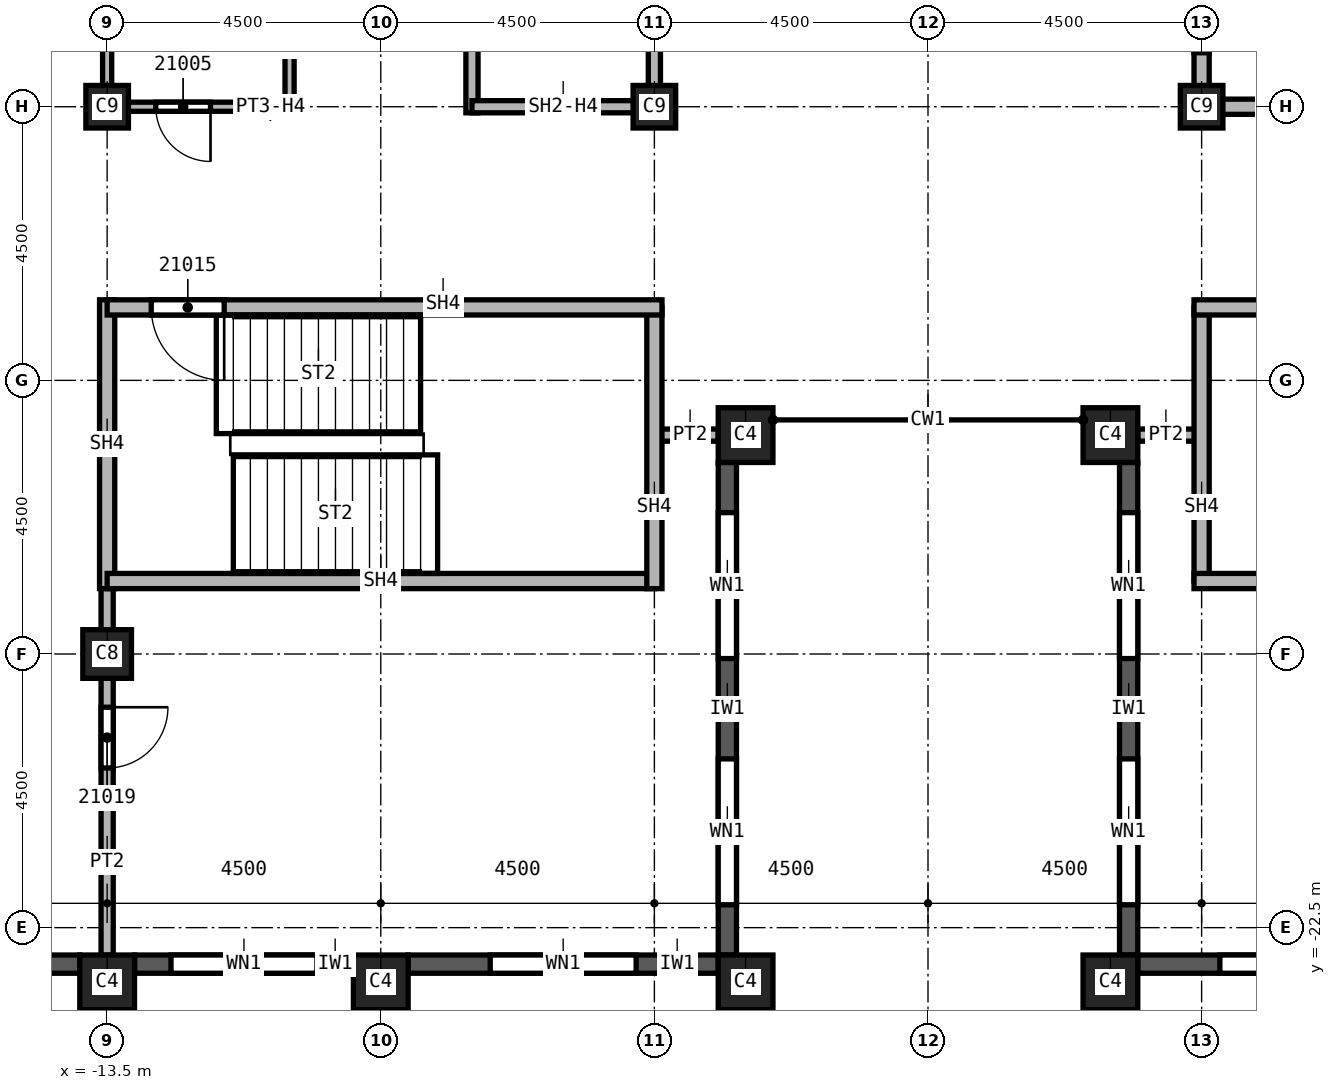
"""IFC4 building model, lengths in metres.
Left out: names, types, materials, properties, quantities, classifications, styles, units other than length and angle.
Written with IfcOpenShell. Run it as: python <this file> out.ifc"""

import sys

from ifc_helpers import new_model, si_unit, direction, frame, frame_2d, origin, origin_2d, place, context, subcontext, project, spatial, rectangle, extrude, element, fill, save


model = new_model("IFC4")
c1 = context("Model", 3, precision=1e-05, world=origin(), true_north=direction((0.0, 1.0)))
c2 = subcontext(c1, "Body", "Model", "MODEL_VIEW")
j1 = project(units=[si_unit("LENGTHUNIT", "METRE"), si_unit("PLANEANGLEUNIT", "RADIAN")], contexts=[c1])
p1 = place(None, origin())
s1 = spatial("IfcSite", under=j1, at=p1, CompositionType="ELEMENT")
p2 = place(p1, origin())
s2 = spatial("IfcBuilding", under=s1, at=p2, CompositionType="ELEMENT")
p3 = place(p2, frame((0.0, 0.0, 308.0)))
s3 = spatial("IfcBuildingStorey", under=s2, at=p3, CompositionType="ELEMENT", Elevation=308.0)
p4 = place(p3, frame((-13.5, -18.0, 0.0), z_axis=(0.0, 0.0, 1.0), x_axis=(1.0, 0.0, 0.0)))
e1 = element("IfcColumn", 1, at=p4, inside=s3, PredefinedType="COLUMN", context=c2, shape_type="SweptSolid", body=[
    extrude(rectangle(XDim=0.8, YDim=0.8, at=origin_2d()), origin(), (0.0, 0.0, 1.0), 3.74),
])
for number, where, z_axis, x_axis in (
    (2, (4.5, -9.0, 0.0), (0.0, 0.0, 1.0), (1.0, 0.0, 0.0)),
    (3, (-4.5, -9.0, 0.0), (0.0, 0.0, 1.0), (1.0, 0.0, 0.0)),
    (4, (-13.5, -9.0, 0.0), (0.0, 0.0, 1.0), (1.0, 0.0, 0.0)),
):
    element("IfcColumn", number, at=place(p3, frame(where, z_axis=z_axis, x_axis=x_axis)), inside=s3, PredefinedType="COLUMN", context=c2, shape_type="SweptSolid", body=[
        extrude(rectangle(XDim=0.7, YDim=0.7, at=origin_2d()), origin(), (0.0, 0.0, 1.0), 3.74),
    ])
for number, where, z_axis, x_axis in (
    (5, (3.0, -23.4, 0.0), (0.0, 0.0, 1.0), (1.0, 0.0, 0.0)),
    (6, (-3.0, -23.4, 0.0), (0.0, 0.0, 1.0), (1.0, 0.0, 0.0)),
    (7, (-9.0, -23.4, 0.0), (0.0, 0.0, 1.0), (1.0, 0.0, 0.0)),
    (8, (-13.5, -23.4, 0.0), (0.0, 0.0, 1.0), (1.0, 0.0, 0.0)),
    (9, (3.0, -14.4, 0.0), (0.0, 0.0, 1.0), (1.0, 0.0, 0.0)),
    (10, (-3.0, -14.4, 0.0), (0.0, 0.0, 1.0), (1.0, 0.0, 0.0)),
):
    element("IfcColumn", number, at=place(p3, frame(where, z_axis=z_axis, x_axis=x_axis)), inside=s3, PredefinedType="COLUMN", context=c2, shape_type="SweptSolid", body=[
        extrude(rectangle(XDim=0.9, YDim=0.9, at=origin_2d()), origin(), (0.0, 0.0, 1.0), 3.74),
    ])
p5 = place(p3, frame((-17.55, -23.1, 0.0), z_axis=(0.0, 0.0, 1.0), x_axis=(1.0, 0.0, 0.0)))
e11 = element("IfcWall", 11, at=p5, inside=s3, PredefinedType="SOLIDWALL", context=c2, shape_type="SweptSolid", body=[
    extrude(rectangle(XDim=3.6, YDim=0.3, at=frame_2d((1.8, 0.0))), origin(), (0.0, 0.0, 1.0), 3.14),
])
p6 = place(p5, frame((0.775, 0.0, 0.8)))
e12 = element("IfcOpeningElement", 12, at=p6, cuts=e11, PredefinedType="OPENING", context=c2, shape_type="SweptSolid", body=[
    extrude(rectangle(XDim=1.0, YDim=1.95, at=frame_2d((0.5, 0.975))), frame((0.0, 0.15, 0.0), z_axis=(0.0, -1.0, 0.0), x_axis=(1.0, 0.0, 0.0)), (0.0, 0.0, 1.0), 0.3),
])
p7 = place(p5, frame((2.375, 0.0, 0.8)))
e13 = element("IfcOpeningElement", 13, at=p7, cuts=e11, PredefinedType="OPENING", context=c2, shape_type="SweptSolid", body=[
    extrude(rectangle(XDim=0.6, YDim=1.95, at=frame_2d((0.3, 0.975))), frame((0.0, 0.15, 0.0), z_axis=(0.0, -1.0, 0.0), x_axis=(1.0, 0.0, 0.0)), (0.0, 0.0, 1.0), 0.3),
])
p8 = place(p3, frame((-13.05, -23.1, 0.0), z_axis=(0.0, 0.0, 1.0), x_axis=(1.0, 0.0, 0.0)))
e14 = element("IfcWall", 14, at=p8, inside=s3, PredefinedType="SOLIDWALL", context=c2, shape_type="SweptSolid", body=[
    extrude(rectangle(XDim=3.6, YDim=0.3, at=frame_2d((1.8, 0.0))), origin(), (0.0, 0.0, 1.0), 3.14),
])
p9 = place(p8, frame((0.6, 0.0, 0.8)))
e15 = element("IfcOpeningElement", 15, at=p9, cuts=e14, PredefinedType="OPENING", context=c2, shape_type="SweptSolid", body=[
    extrude(rectangle(XDim=2.4, YDim=1.95, at=frame_2d((1.2, 0.975))), frame((0.0, 0.15, 0.0), z_axis=(0.0, -1.0, 0.0), x_axis=(1.0, 0.0, 0.0)), (0.0, 0.0, 1.0), 0.3),
])
p10 = place(p3, frame((-8.55, -23.1, 0.0), z_axis=(0.0, 0.0, 1.0), x_axis=(1.0, 0.0, 0.0)))
e16 = element("IfcWall", 16, at=p10, inside=s3, PredefinedType="SOLIDWALL", context=c2, shape_type="SweptSolid", body=[
    extrude(rectangle(XDim=5.1, YDim=0.3, at=frame_2d((2.55, 0.0))), origin(), (0.0, 0.0, 1.0), 3.14),
])
p11 = place(p10, frame((1.35, 0.0, 0.8)))
e17 = element("IfcOpeningElement", 17, at=p11, cuts=e16, PredefinedType="OPENING", context=c2, shape_type="SweptSolid", body=[
    extrude(rectangle(XDim=2.4, YDim=1.95, at=frame_2d((1.2, 0.975))), frame((0.0, 0.15, 0.0), z_axis=(0.0, -1.0, 0.0), x_axis=(1.0, 0.0, 0.0)), (0.0, 0.0, 1.0), 0.3),
])
p12 = place(p3, frame((-3.3, -22.95, 0.0), z_axis=(0.0, 0.0, 1.0), x_axis=(0.0, 1.0, 0.0)))
e18 = element("IfcWall", 18, at=p12, inside=s3, PredefinedType="SOLIDWALL", context=c2, shape_type="SweptSolid", body=[
    extrude(rectangle(XDim=8.1, YDim=0.3, at=frame_2d((4.05, 0.0))), origin(), (0.0, 0.0, 1.0), 3.14),
])
p13 = place(p12, frame((0.825, 0.0, 0.8)))
e19 = element("IfcOpeningElement", 19, at=p13, cuts=e18, PredefinedType="OPENING", context=c2, shape_type="SweptSolid", body=[
    extrude(rectangle(XDim=2.4, YDim=1.95, at=frame_2d((1.2, 0.975))), frame((0.0, 0.15, 0.0), z_axis=(0.0, -1.0, 0.0), x_axis=(1.0, 0.0, 0.0)), (0.0, 0.0, 1.0), 0.3),
])
p14 = place(p12, frame((4.875, 0.0, 0.8)))
e20 = element("IfcOpeningElement", 20, at=p14, cuts=e18, PredefinedType="OPENING", context=c2, shape_type="SweptSolid", body=[
    extrude(rectangle(XDim=2.4, YDim=1.95, at=frame_2d((1.2, 0.975))), frame((0.0, 0.15, 0.0), z_axis=(0.0, -1.0, 0.0), x_axis=(1.0, 0.0, 0.0)), (0.0, 0.0, 1.0), 0.3),
])
p15 = place(p3, frame((3.3, -14.85, 0.0), z_axis=(0.0, 0.0, 1.0), x_axis=(0.0, -1.0, 0.0)))
e21 = element("IfcWall", 21, at=p15, inside=s3, PredefinedType="SOLIDWALL", context=c2, shape_type="SweptSolid", body=[
    extrude(rectangle(XDim=8.1, YDim=0.3, at=frame_2d((4.05, 0.0))), origin(), (0.0, 0.0, 1.0), 3.14),
])
p16 = place(p15, frame((0.825, 0.0, 0.8)))
e22 = element("IfcOpeningElement", 22, at=p16, cuts=e21, PredefinedType="OPENING", context=c2, shape_type="SweptSolid", body=[
    extrude(rectangle(XDim=2.4, YDim=1.95, at=frame_2d((1.2, 0.975))), frame((0.0, 0.15, 0.0), z_axis=(0.0, -1.0, 0.0), x_axis=(1.0, 0.0, 0.0)), (0.0, 0.0, 1.0), 0.3),
])
p17 = place(p15, frame((4.875, 0.0, 0.8)))
e23 = element("IfcOpeningElement", 23, at=p17, cuts=e21, PredefinedType="OPENING", context=c2, shape_type="SweptSolid", body=[
    extrude(rectangle(XDim=2.4, YDim=1.95, at=frame_2d((1.2, 0.975))), frame((0.0, 0.15, 0.0), z_axis=(0.0, -1.0, 0.0), x_axis=(1.0, 0.0, 0.0)), (0.0, 0.0, 1.0), 0.3),
])
p18 = place(p3, frame((3.45, -23.1, 0.0), z_axis=(0.0, 0.0, 1.0), x_axis=(1.0, 0.0, 0.0)))
e24 = element("IfcWall", 24, at=p18, inside=s3, PredefinedType="SOLIDWALL", context=c2, shape_type="SweptSolid", body=[
    extrude(rectangle(XDim=5.1, YDim=0.3, at=frame_2d((2.55, 0.0))), origin(), (0.0, 0.0, 1.0), 3.14),
])
p19 = place(p18, frame((1.35, 0.0, 0.8)))
e25 = element("IfcOpeningElement", 25, at=p19, cuts=e24, PredefinedType="OPENING", context=c2, shape_type="SweptSolid", body=[
    extrude(rectangle(XDim=2.4, YDim=1.95, at=frame_2d((1.2, 0.975))), frame((0.0, 0.15, 0.0), z_axis=(0.0, -1.0, 0.0), x_axis=(1.0, 0.0, 0.0)), (0.0, 0.0, 1.0), 0.3),
])
p20 = place(p3, frame((-13.5, -16.675, 0.0), z_axis=(0.0, 0.0, 1.0), x_axis=(0.0, -1.0, 0.0)))
e26 = element("IfcWall", 26, at=p20, inside=s3, PredefinedType="PARTITIONING", context=c2, shape_type="SweptSolid", body=[
    extrude(rectangle(XDim=6.275, YDim=0.2, at=frame_2d((3.137, 0.0))), origin(), (0.0, 0.0, 1.0), 3.74),
])
p21 = place(p20, frame((2.2, 0.0, 0.0)))
e27 = element("IfcOpeningElement", 27, at=p21, cuts=e26, PredefinedType="OPENING", context=c2, shape_type="SweptSolid", body=[
    extrude(rectangle(XDim=1.0, YDim=2.1, at=frame_2d((0.5, 1.05))), frame((0.0, 0.1, 0.0), z_axis=(0.0, -1.0, 0.0), x_axis=(1.0, 0.0, 0.0)), (0.0, 0.0, 1.0), 0.2),
])
for number, where, z_axis, x_axis in (
    (28, (-3.45, -14.4, 0.0), (0.0, 0.0, 1.0), (-1.0, 0.0, 0.0)),
    (29, (4.5, -14.4, 0.0), (0.0, 0.0, 1.0), (-1.0, 0.0, 0.0)),
):
    element("IfcWall", number, at=place(p3, frame(where, z_axis=z_axis, x_axis=x_axis)), inside=s3, PredefinedType="PARTITIONING", context=c2, shape_type="SweptSolid", body=[
        extrude(rectangle(XDim=1.05, YDim=0.2, at=frame_2d((0.525, 0.0))), origin(), (0.0, 0.0, 1.0), 3.74),
    ])
p22 = place(p3, frame((-7.5, -9.1, 0.0), z_axis=(0.0, 0.0, 1.0), x_axis=(0.0, 1.0, 0.0)))
e30 = element("IfcWall", 30, at=p22, inside=s3, PredefinedType="SOLIDWALL", context=c2, shape_type="SweptSolid", body=[
    extrude(rectangle(XDim=6.225, YDim=0.2, at=frame_2d((3.113, 0.0))), origin(), (0.0, 0.0, 1.0), 3.74),
])
p23 = place(p3, frame((-4.5, -9.0, 0.0), z_axis=(0.0, 0.0, 1.0), x_axis=(-1.0, 0.0, 0.0)))
e31 = element("IfcWall", 31, at=p23, inside=s3, PredefinedType="SOLIDWALL", context=c2, shape_type="SweptSolid", body=[
    extrude(rectangle(XDim=3.0, YDim=0.2, at=frame_2d((1.5, 0.0))), origin(), (0.0, 0.0, 1.0), 3.062),
])
p24 = place(p3, frame((-4.5, 6.0, 0.0), z_axis=(0.0, 0.0, 1.0), x_axis=(0.0, -1.0, 0.0)))
e32 = element("IfcWall", 32, at=p24, inside=s3, PredefinedType="SOLIDWALL", context=c2, shape_type="SweptSolid", body=[
    extrude(rectangle(XDim=15.1, YDim=0.2, at=frame_2d((7.55, 0.0))), origin(), (0.0, 0.0, 1.0), 3.062),
])
p25 = place(p24, frame((6.85, 0.0, 0.0)))
e33 = element("IfcOpeningElement", 33, at=p25, cuts=e32, PredefinedType="OPENING", context=c2, shape_type="SweptSolid", body=[
    extrude(rectangle(XDim=1.1, YDim=2.1, at=frame_2d((0.55, 1.05))), frame((0.0, 0.1, 0.0), z_axis=(0.0, -1.0, 0.0), x_axis=(1.0, 0.0, 0.0)), (0.0, 0.0, 1.0), 0.2),
])
p26 = place(p24, frame((1.6, 0.0, 0.0)))
e34 = element("IfcOpeningElement", 34, at=p26, cuts=e32, PredefinedType="OPENING", context=c2, shape_type="SweptSolid", body=[
    extrude(rectangle(XDim=1.1, YDim=2.1, at=frame_2d((0.55, 1.05))), frame((0.0, 0.1, 0.0), z_axis=(0.0, -1.0, 0.0), x_axis=(1.0, 0.0, 0.0)), (0.0, 0.0, 1.0), 0.2),
])
p27 = place(p3, frame((4.5, -9.125, 0.0), z_axis=(0.0, 0.0, 1.0), x_axis=(0.0, 1.0, 0.0)))
e35 = element("IfcWall", 35, at=p27, inside=s3, PredefinedType="SOLIDWALL", context=c2, shape_type="SweptSolid", body=[
    extrude(rectangle(XDim=3.125, YDim=0.25, at=frame_2d((1.562, 0.0))), origin(), (0.0, 0.0, 1.0), 3.062),
])
p28 = place(p27, frame((1.012, 0.0, 0.0)))
e36 = element("IfcOpeningElement", 36, at=p28, cuts=e35, PredefinedType="OPENING", context=c2, shape_type="SweptSolid", body=[
    extrude(rectangle(XDim=1.1, YDim=2.1, at=frame_2d((0.55, 1.05))), frame((0.0, 0.125, 0.0), z_axis=(0.0, -1.0, 0.0), x_axis=(1.0, 0.0, 0.0)), (0.0, 0.0, 1.0), 0.25),
])
p29 = place(p3, frame((7.5, -9.0, 0.0), z_axis=(0.0, 0.0, 1.0), x_axis=(-1.0, 0.0, 0.0)))
e37 = element("IfcWall", 37, at=p29, inside=s3, PredefinedType="SOLIDWALL", context=c2, shape_type="SweptSolid", body=[
    extrude(rectangle(XDim=3.0, YDim=0.25, at=frame_2d((1.5, 0.0))), origin(), (0.0, 0.0, 1.0), 3.062),
])
p30 = place(p3, frame((-13.5, -12.175, 0.0), z_axis=(0.0, 0.0, 1.0), x_axis=(0.0, -1.0, 0.0)))
e38 = element("IfcWall", 38, at=p30, inside=s3, PredefinedType="SOLIDWALL", context=c2, shape_type="SweptSolid", body=[
    extrude(rectangle(XDim=4.75, YDim=0.25, at=frame_2d((2.375, 0.0))), origin(), (0.0, 0.0, 1.0), 3.74),
])
p31 = place(p3, frame((-4.5, -16.8, 0.0), z_axis=(0.0, 0.0, 1.0), x_axis=(-1.0, 0.0, 0.0)))
e39 = element("IfcWall", 39, at=p31, inside=s3, PredefinedType="SOLIDWALL", context=c2, shape_type="SweptSolid", body=[
    extrude(rectangle(XDim=9.0, YDim=0.25, at=frame_2d((4.5, 0.0))), origin(), (0.0, 0.0, 1.0), 3.74),
])
p32 = place(p3, frame((-4.5, -12.3, 0.0), z_axis=(0.0, 0.0, 1.0), x_axis=(0.0, -1.0, 0.0)))
e40 = element("IfcWall", 40, at=p32, inside=s3, PredefinedType="SOLIDWALL", context=c2, shape_type="SweptSolid", body=[
    extrude(rectangle(XDim=4.625, YDim=0.25, at=frame_2d((2.312, 0.0))), origin(), (0.0, 0.0, 1.0), 3.74),
])
p33 = place(p3, frame((-4.375, -12.3, 0.0), z_axis=(0.0, 0.0, 1.0), x_axis=(-1.0, 0.0, 0.0)))
e41 = element("IfcWall", 41, at=p33, inside=s3, PredefinedType="SOLIDWALL", context=c2, shape_type="SweptSolid", body=[
    extrude(rectangle(XDim=9.125, YDim=0.25, at=frame_2d((4.562, 0.0))), origin(), (0.0, 0.0, 1.0), 3.74),
])
p34 = place(p33, frame((7.2, 0.0, 0.0)))
e42 = element("IfcOpeningElement", 42, at=p34, cuts=e41, PredefinedType="OPENING", context=c2, shape_type="SweptSolid", body=[
    extrude(rectangle(XDim=1.2, YDim=2.1, at=frame_2d((0.6, 1.05))), frame((0.0, 0.125, 0.0), z_axis=(0.0, -1.0, 0.0), x_axis=(1.0, 0.0, 0.0)), (0.0, 0.0, 1.0), 0.25),
])
p35 = place(p3, frame((4.5, -16.8, 0.0), z_axis=(0.0, 0.0, 1.0), x_axis=(0.0, 1.0, 0.0)))
e43 = element("IfcWall", 43, at=p35, inside=s3, PredefinedType="SOLIDWALL", context=c2, shape_type="SweptSolid", body=[
    extrude(rectangle(XDim=4.5, YDim=0.25, at=frame_2d((2.25, 0.0))), origin(), (0.0, 0.0, 1.0), 3.74),
])
p36 = place(p3, frame((13.5, -16.8, 0.0), z_axis=(0.0, 0.0, 1.0), x_axis=(-1.0, 0.0, 0.0)))
e44 = element("IfcWall", 44, at=p36, inside=s3, PredefinedType="SOLIDWALL", context=c2, shape_type="SweptSolid", body=[
    extrude(rectangle(XDim=9.125, YDim=0.25, at=frame_2d((4.562, 0.0))), origin(), (0.0, 0.0, 1.0), 3.74),
])
p37 = place(p3, frame((13.5, -12.3, 0.0), z_axis=(0.0, 0.0, 1.0), x_axis=(-1.0, 0.0, 0.0)))
e45 = element("IfcWall", 45, at=p37, inside=s3, PredefinedType="SOLIDWALL", context=c2, shape_type="SweptSolid", body=[
    extrude(rectangle(XDim=9.125, YDim=0.25, at=frame_2d((4.562, 0.0))), origin(), (0.0, 0.0, 1.0), 3.74),
])
p38 = place(p37, frame((0.6, 0.0, 0.0)))
e46 = element("IfcOpeningElement", 46, at=p38, cuts=e45, PredefinedType="OPENING", context=c2, shape_type="SweptSolid", body=[
    extrude(rectangle(XDim=1.2, YDim=2.1, at=frame_2d((0.6, 1.05))), frame((0.0, 0.125, 0.0), z_axis=(0.0, -1.0, 0.0), x_axis=(1.0, 0.0, 0.0)), (0.0, 0.0, 1.0), 0.25),
])
p39 = place(p3, frame((-13.5, -9.075, 0.0), z_axis=(0.0, 0.0, 1.0), x_axis=(0.0, 1.0, 0.0)))
e47 = element("IfcWall", 47, at=p39, inside=s3, PredefinedType="PARTITIONING", context=c2, shape_type="SweptSolid", body=[
    extrude(rectangle(XDim=2.075, YDim=0.15, at=frame_2d((1.038, 0.0))), origin(), (0.0, 0.0, 1.0), 3.062),
])
p40 = place(p3, frame((-10.5, -9.075, 0.0), z_axis=(0.0, 0.0, 1.0), x_axis=(0.0, 1.0, 0.0)))
e48 = element("IfcWall", 48, at=p40, inside=s3, PredefinedType="PARTITIONING", context=c2, shape_type="SweptSolid", body=[
    extrude(rectangle(XDim=2.15, YDim=0.15, at=frame_2d((1.075, 0.0))), origin(), (0.0, 0.0, 1.0), 3.74),
])
p41 = place(p3, frame((-10.5, -9.0, 0.0), z_axis=(0.0, 0.0, 1.0), x_axis=(-1.0, 0.0, 0.0)))
e49 = element("IfcWall", 49, at=p41, inside=s3, PredefinedType="PARTITIONING", context=c2, shape_type="SweptSolid", body=[
    extrude(rectangle(XDim=3.0, YDim=0.15, at=frame_2d((1.5, 0.0))), origin(), (0.0, 0.0, 1.0), 3.062),
])
p42 = place(p41, frame((1.3, 0.0, 0.0)))
e50 = element("IfcOpeningElement", 50, at=p42, cuts=e49, PredefinedType="OPENING", context=c2, shape_type="SweptSolid", body=[
    extrude(rectangle(XDim=0.9, YDim=2.1, at=frame_2d((0.45, 1.05))), frame((0.0, 0.075, 0.0), z_axis=(0.0, -1.0, 0.0), x_axis=(1.0, 0.0, 0.0)), (0.0, 0.0, 1.0), 0.15),
])
p43 = place(p9, origin())
e51 = element("IfcWindow", 51, at=p43, inside=s3, PartitioningType="SINGLE_PANEL", PredefinedType="WINDOW", context=c2, shape_type="SweptSolid", body=[
    extrude(rectangle(XDim=2.4, YDim=1.95, at=frame_2d((1.2, 0.975))), frame((0.0, 0.03, 0.0), z_axis=(0.0, -1.0, 0.0), x_axis=(1.0, 0.0, 0.0)), (0.0, 0.0, 1.0), 0.06),
])
fill(e15, e51)
p44 = place(p11, origin())
e52 = element("IfcWindow", 52, at=p44, inside=s3, PartitioningType="SINGLE_PANEL", PredefinedType="WINDOW", context=c2, shape_type="SweptSolid", body=[
    extrude(rectangle(XDim=2.4, YDim=1.95, at=frame_2d((1.2, 0.975))), frame((0.0, 0.03, 0.0), z_axis=(0.0, -1.0, 0.0), x_axis=(1.0, 0.0, 0.0)), (0.0, 0.0, 1.0), 0.06),
])
fill(e17, e52)
p45 = place(p13, origin())
e53 = element("IfcWindow", 53, at=p45, inside=s3, PartitioningType="SINGLE_PANEL", PredefinedType="WINDOW", context=c2, shape_type="SweptSolid", body=[
    extrude(rectangle(XDim=2.4, YDim=1.95, at=frame_2d((1.2, 0.975))), frame((0.0, 0.03, 0.0), z_axis=(0.0, -1.0, 0.0), x_axis=(1.0, 0.0, 0.0)), (0.0, 0.0, 1.0), 0.06),
])
fill(e19, e53)
p46 = place(p14, origin())
e54 = element("IfcWindow", 54, at=p46, inside=s3, PartitioningType="SINGLE_PANEL", PredefinedType="WINDOW", context=c2, shape_type="SweptSolid", body=[
    extrude(rectangle(XDim=2.4, YDim=1.95, at=frame_2d((1.2, 0.975))), frame((0.0, 0.03, 0.0), z_axis=(0.0, -1.0, 0.0), x_axis=(1.0, 0.0, 0.0)), (0.0, 0.0, 1.0), 0.06),
])
fill(e20, e54)
p47 = place(p16, origin())
e55 = element("IfcWindow", 55, at=p47, inside=s3, PartitioningType="SINGLE_PANEL", PredefinedType="WINDOW", context=c2, shape_type="SweptSolid", body=[
    extrude(rectangle(XDim=2.4, YDim=1.95, at=frame_2d((1.2, 0.975))), frame((0.0, 0.03, 0.0), z_axis=(0.0, -1.0, 0.0), x_axis=(1.0, 0.0, 0.0)), (0.0, 0.0, 1.0), 0.06),
])
fill(e22, e55)
p48 = place(p17, origin())
e56 = element("IfcWindow", 56, at=p48, inside=s3, PartitioningType="SINGLE_PANEL", PredefinedType="WINDOW", context=c2, shape_type="SweptSolid", body=[
    extrude(rectangle(XDim=2.4, YDim=1.95, at=frame_2d((1.2, 0.975))), frame((0.0, 0.03, 0.0), z_axis=(0.0, -1.0, 0.0), x_axis=(1.0, 0.0, 0.0)), (0.0, 0.0, 1.0), 0.06),
])
fill(e23, e56)
p49 = place(p19, origin())
e57 = element("IfcWindow", 57, at=p49, inside=s3, PartitioningType="SINGLE_PANEL", PredefinedType="WINDOW", context=c2, shape_type="SweptSolid", body=[
    extrude(rectangle(XDim=2.4, YDim=1.95, at=frame_2d((1.2, 0.975))), frame((0.0, 0.03, 0.0), z_axis=(0.0, -1.0, 0.0), x_axis=(1.0, 0.0, 0.0)), (0.0, 0.0, 1.0), 0.06),
])
fill(e25, e57)
p50 = place(p42, origin())
e58 = element("IfcDoor", 58, at=p50, inside=s3, OperationType="SINGLE_SWING_RIGHT", PredefinedType="DOOR", context=c2, shape_type="SweptSolid", body=[
    extrude(rectangle(XDim=0.9, YDim=2.1, at=frame_2d((0.45, 1.05))), frame((0.0, 0.025, 0.0), z_axis=(0.0, -1.0, 0.0), x_axis=(1.0, 0.0, 0.0)), (0.0, 0.0, 1.0), 0.05),
])
fill(e50, e58)
p51 = place(p34, origin())
e59 = element("IfcDoor", 59, at=p51, inside=s3, OperationType="SINGLE_SWING_RIGHT", PredefinedType="DOOR", context=c2, shape_type="SweptSolid", body=[
    extrude(rectangle(XDim=1.2, YDim=2.1, at=frame_2d((0.6, 1.05))), frame((0.0, 0.025, 0.0), z_axis=(0.0, -1.0, 0.0), x_axis=(1.0, 0.0, 0.0)), (0.0, 0.0, 1.0), 0.05),
])
fill(e42, e59)
p52 = place(p21, origin())
e60 = element("IfcDoor", 60, at=p52, inside=s3, OperationType="SINGLE_SWING_RIGHT", PredefinedType="DOOR", context=c2, shape_type="SweptSolid", body=[
    extrude(rectangle(XDim=1.0, YDim=2.1, at=frame_2d((0.5, 1.05))), frame((0.0, 0.025, 0.0), z_axis=(0.0, -1.0, 0.0), x_axis=(1.0, 0.0, 0.0)), (0.0, 0.0, 1.0), 0.05),
])
fill(e27, e60)
p53 = place(p28, origin())
e61 = element("IfcDoor", 61, at=p53, inside=s3, OperationType="SLIDING_TO_LEFT", PredefinedType="DOOR", context=c2, shape_type="SweptSolid", body=[
    extrude(rectangle(XDim=1.1, YDim=2.1, at=frame_2d((0.55, 1.05))), frame((0.0, 0.025, 0.0), z_axis=(0.0, -1.0, 0.0), x_axis=(1.0, 0.0, 0.0)), (0.0, 0.0, 1.0), 0.05),
])
fill(e36, e61)
save(model, sys.argv[1])
